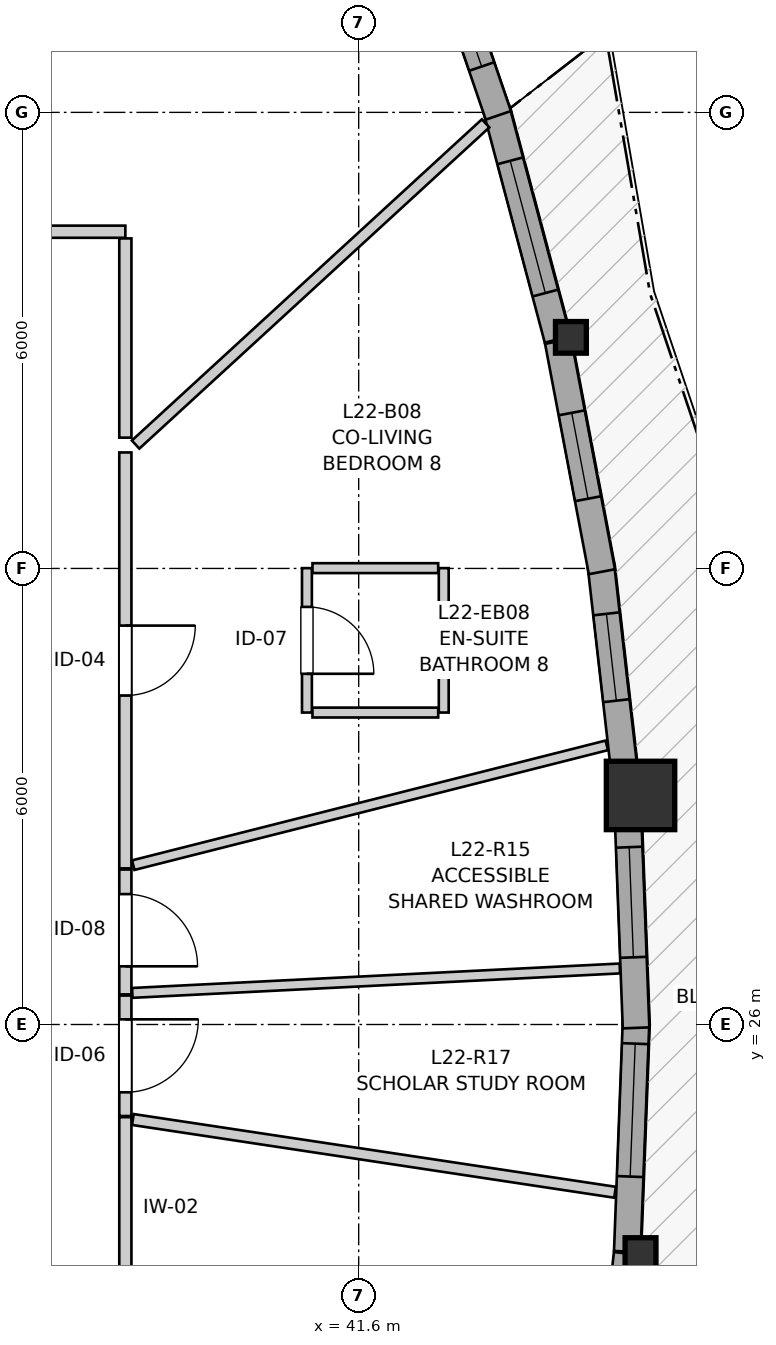
"""IFC4 building model, lengths in metres.
Left out: names, types, materials, properties, quantities, classifications, styles, units other than length and angle.
Written with IfcOpenShell. Run it as: python <this file> out.ifc"""

import sys

from ifc_helpers import new_model, si_unit, direction, frame, frame_2d, origin, origin_2d, place, context, subcontext, project, spatial, rectangle, i_section, extrude, source, transform, mapped, element, fill, save


model = new_model("IFC4")
c1 = context("Model", 3, precision=1e-05, world=origin(), true_north=direction((0.0, 1.0)))
c2 = subcontext(c1, "Body", "Model", "MODEL_VIEW")
j1 = project(units=[si_unit("LENGTHUNIT", "METRE"), si_unit("PLANEANGLEUNIT", "RADIAN")], contexts=[c1])
p1 = place(None, origin())
s1 = spatial("IfcSite", under=j1, at=p1, CompositionType="ELEMENT")
p2 = place(p1, origin())
s2 = spatial("IfcBuilding", under=s1, at=p2, CompositionType="ELEMENT")
p3 = place(p2, frame((0.0, 0.0, 76.8)))
s3 = spatial("IfcBuildingStorey", under=s2, at=p3, CompositionType="ELEMENT", Elevation=76.8)
m1 = source(origin(), c2, "Body", "SweptSolid", [
    extrude(i_section(OverallWidth=0.406, OverallDepth=0.416, WebThickness=0.027, FlangeThickness=0.044, FilletRadius=0.015, at=origin_2d()), origin(), (0.0, 0.0, 1.0), 2.935),
])
p4 = place(p3, frame((45.308, 22.987, 0.0), z_axis=(0.0, 0.0, 1.0), x_axis=(1.0, 0.0, 0.0)))
e1 = element("IfcColumn", 1, at=p4, inside=s3, PredefinedType="PILASTER", context=c2, shape_type="MappedRepresentation", body=[
    mapped(m1, transform((0.0, 0.0, 0.0), x_axis=(1.0, 0.0, 0.0), y_axis=(0.0, 1.0, 0.0), z_axis=(0.0, 0.0, 1.0), scale=1.0)),
])
m2 = source(origin(), c2, "Body", "SweptSolid", [
    extrude(rectangle(XDim=0.9, YDim=0.9, at=origin_2d()), origin(), (0.0, 0.0, 1.0), 2.935),
])
p5 = place(p3, frame((45.308, 29.013, 0.0), z_axis=(0.0, 0.0, 1.0), x_axis=(1.0, 0.0, 0.0)))
e2 = element("IfcColumn", 2, at=p5, inside=s3, PredefinedType="COLUMN", context=c2, shape_type="MappedRepresentation", body=[
    mapped(m2, transform((0.0, 0.0, 0.0), x_axis=(1.0, 0.0, 0.0), y_axis=(0.0, 1.0, 0.0), z_axis=(0.0, 0.0, 1.0), scale=1.0)),
])
p6 = place(p3, frame((44.392, 35.04, 0.0), z_axis=(0.0, 0.0, 1.0), x_axis=(1.0, 0.0, 0.0)))
e3 = element("IfcColumn", 3, at=p6, inside=s3, PredefinedType="PILASTER", context=c2, shape_type="MappedRepresentation", body=[
    mapped(m1, transform((0.0, 0.0, 0.0), x_axis=(1.0, 0.0, 0.0), y_axis=(0.0, 1.0, 0.0), z_axis=(0.0, 0.0, 1.0), scale=1.0)),
])
p7 = place(p3, frame((44.787, 19.955, 0.0), z_axis=(0.0, 0.0, 1.0), x_axis=(0.113232876367, 0.993568475602, 0.0)))
e4 = element("IfcWall", 4, at=p7, inside=s3, PredefinedType="SOLIDWALL", context=c2, shape_type="SweptSolid", body=[
    extrude(rectangle(XDim=3.051, YDim=0.35, at=frame_2d((1.525, 0.0))), origin(), (0.0, 0.0, 1.0), 2.465),
])
p8 = place(p7, frame((1.06, 0.0, 0.82)))
e5 = element("IfcOpeningElement", 5, at=p8, cuts=e4, PredefinedType="OPENING", context=c2, shape_type="SweptSolid", body=[
    extrude(rectangle(XDim=0.95, YDim=1.35, at=frame_2d((0.475, 0.675))), frame((0.0, 0.185, 0.0), z_axis=(0.0, -1.0, 0.0), x_axis=(1.0, 0.0, 0.0)), (0.0, 0.0, 1.0), 0.37),
])
p9 = place(p3, frame((45.134, 23.013, 0.0), z_axis=(0.0, 0.0, 1.0), x_axis=(0.037984969205, 0.999278310639, 0.0)))
e6 = element("IfcWall", 6, at=p9, inside=s3, PredefinedType="SOLIDWALL", context=c2, shape_type="SweptSolid", body=[
    extrude(rectangle(XDim=3.034, YDim=0.35, at=frame_2d((1.517, 0.0))), origin(), (0.0, 0.0, 1.0), 2.465),
])
p10 = place(p9, frame((0.987, 0.0, 0.82)))
e7 = element("IfcOpeningElement", 7, at=p10, cuts=e6, PredefinedType="OPENING", context=c2, shape_type="SweptSolid", body=[
    extrude(rectangle(XDim=1.75, YDim=1.3, at=frame_2d((0.875, 0.65))), frame((0.0, 0.185, 0.0), z_axis=(0.0, -1.0, 0.0), x_axis=(1.0, 0.0, 0.0)), (0.0, 0.0, 1.0), 0.37),
])
p11 = place(p3, frame((45.249, 25.955, 0.0), z_axis=(0.0, 0.0, 1.0), x_axis=(-0.0379756963, 0.999278663082, 0.0)))
e8 = element("IfcWall", 8, at=p11, inside=s3, PredefinedType="SOLIDWALL", context=c2, shape_type="SweptSolid", body=[
    extrude(rectangle(XDim=2.829, YDim=0.35, at=frame_2d((1.414, 0.0))), origin(), (0.0, 0.0, 1.0), 2.465),
])
p12 = place(p11, frame((0.929, 0.0, 0.82)))
e9 = element("IfcOpeningElement", 9, at=p12, cuts=e8, PredefinedType="OPENING", context=c2, shape_type="SweptSolid", body=[
    extrude(rectangle(XDim=1.45, YDim=1.25, at=frame_2d((0.725, 0.625))), frame((0.0, 0.185, 0.0), z_axis=(0.0, -1.0, 0.0), x_axis=(1.0, 0.0, 0.0)), (0.0, 0.0, 1.0), 0.37),
])
p13 = place(p3, frame((45.109, 29.217, 0.0), z_axis=(0.0, 0.0, 1.0), x_axis=(-0.11323690057, 0.993568016972, 0.0)))
e10 = element("IfcWall", 10, at=p13, inside=s3, PredefinedType="SOLIDWALL", context=c2, shape_type="SweptSolid", body=[
    extrude(rectangle(XDim=2.846, YDim=0.35, at=frame_2d((1.423, 0.0))), origin(), (0.0, 0.0, 1.0), 2.465),
])
p14 = place(p13, frame((1.05, 0.0, 0.82)))
e11 = element("IfcOpeningElement", 11, at=p14, cuts=e10, PredefinedType="OPENING", context=c2, shape_type="SweptSolid", body=[
    extrude(rectangle(XDim=1.15, YDim=1.2, at=frame_2d((0.575, 0.6))), frame((0.0, 0.185, 0.0), z_axis=(0.0, -1.0, 0.0), x_axis=(1.0, 0.0, 0.0)), (0.0, 0.0, 1.0), 0.37),
])
p15 = place(p3, frame((44.8, 31.957, 0.0), z_axis=(0.0, 0.0, 1.0), x_axis=(-0.186672102023, 0.982422274954, 0.0)))
e12 = element("IfcWall", 12, at=p15, inside=s3, PredefinedType="SOLIDWALL", context=c2, shape_type="SweptSolid", body=[
    extrude(rectangle(XDim=3.085, YDim=0.35, at=frame_2d((1.542, 0.0))), origin(), (0.0, 0.0, 1.0), 2.465),
])
p16 = place(p15, frame((0.978, 0.0, 0.82)))
e13 = element("IfcOpeningElement", 13, at=p16, cuts=e12, PredefinedType="OPENING", context=c2, shape_type="SweptSolid", body=[
    extrude(rectangle(XDim=1.15, YDim=1.2, at=frame_2d((0.575, 0.6))), frame((0.0, 0.185, 0.0), z_axis=(0.0, -1.0, 0.0), x_axis=(1.0, 0.0, 0.0)), (0.0, 0.0, 1.0), 0.37),
])
p17 = place(p3, frame((44.218, 35.014, 0.0), z_axis=(0.0, 0.0, 1.0), x_axis=(-0.25705209467, 0.96639754792, 0.0)))
e14 = element("IfcWall", 14, at=p17, inside=s3, PredefinedType="SOLIDWALL", context=c2, shape_type="SweptSolid", body=[
    extrude(rectangle(XDim=3.136, YDim=0.35, at=frame_2d((1.568, 0.0))), origin(), (0.0, 0.0, 1.0), 2.465),
])
p18 = place(p17, frame((0.63, 0.0, 0.82)))
e15 = element("IfcOpeningElement", 15, at=p18, cuts=e14, PredefinedType="OPENING", context=c2, shape_type="SweptSolid", body=[
    extrude(rectangle(XDim=1.8, YDim=1.45, at=frame_2d((0.9, 0.725))), frame((0.0, 0.185, 0.0), z_axis=(0.0, -1.0, 0.0), x_axis=(1.0, 0.0, 0.0)), (0.0, 0.0, 1.0), 0.37),
])
p19 = place(p3, frame((43.437, 37.961, 0.0), z_axis=(0.0, 0.0, 1.0), x_axis=(-0.323572555921, 0.946203361363, 0.0)))
e16 = element("IfcWall", 16, at=p19, inside=s3, PredefinedType="SOLIDWALL", context=c2, shape_type="SweptSolid", body=[
    extrude(rectangle(XDim=2.998, YDim=0.35, at=frame_2d((1.499, 0.0))), origin(), (0.0, 0.0, 1.0), 2.465),
])
p20 = place(p19, frame((0.679, 0.0, 0.82)))
e17 = element("IfcOpeningElement", 17, at=p20, cuts=e16, PredefinedType="OPENING", context=c2, shape_type="SweptSolid", body=[
    extrude(rectangle(XDim=1.65, YDim=1.45, at=frame_2d((0.825, 0.725))), frame((0.0, 0.185, 0.0), z_axis=(0.0, -1.0, 0.0), x_axis=(1.0, 0.0, 0.0)), (0.0, 0.0, 1.0), 0.37),
])
p21 = place(p3, frame((38.53, 24.781, 0.0), z_axis=(0.0, 0.0, 1.0), x_axis=(0.0, -1.0, 0.0)))
e18 = element("IfcWall", 18, at=p21, inside=s3, PredefinedType="PARTITIONING", context=c2, shape_type="SweptSolid", body=[
    extrude(rectangle(XDim=7.203, YDim=0.16, at=frame_2d((3.602, 0.0))), origin(), (0.0, 0.0, 1.0), 2.935),
])
p22 = place(p21, frame((3.119, 0.0, 0.0)))
e19 = element("IfcOpeningElement", 19, at=p22, cuts=e18, PredefinedType="OPENING", context=c2, shape_type="SweptSolid", body=[
    extrude(rectangle(XDim=0.96, YDim=2.1, at=frame_2d((0.48, 1.05))), frame((0.0, 0.09, 0.0), z_axis=(0.0, -1.0, 0.0), x_axis=(1.0, 0.0, 0.0)), (0.0, 0.0, 1.0), 0.18),
])
p23 = place(p3, frame((38.53, 33.526, 0.0), z_axis=(0.0, 0.0, 1.0), x_axis=(0.0, -1.0, 0.0)))
e20 = element("IfcWall", 20, at=p23, inside=s3, PredefinedType="PARTITIONING", context=c2, shape_type="SweptSolid", body=[
    extrude(rectangle(XDim=5.472, YDim=0.16, at=frame_2d((2.736, 0.0))), origin(), (0.0, 0.0, 1.0), 2.935),
])
p24 = place(p23, frame((2.278, 0.0, 0.0)))
e21 = element("IfcOpeningElement", 21, at=p24, cuts=e20, PredefinedType="OPENING", context=c2, shape_type="SweptSolid", body=[
    extrude(rectangle(XDim=0.92, YDim=2.1, at=frame_2d((0.46, 1.05))), frame((0.0, 0.09, 0.0), z_axis=(0.0, -1.0, 0.0), x_axis=(1.0, 0.0, 0.0)), (0.0, 0.0, 1.0), 0.18),
])
p25 = place(p3, frame((34.909, 36.43, 0.0), z_axis=(0.0, 0.0, 1.0), x_axis=(1.0, 0.0, 0.0)))
e22 = element("IfcWall", 22, at=p25, inside=s3, PredefinedType="PARTITIONING", context=c2, shape_type="SweptSolid", body=[
    extrude(rectangle(XDim=3.621, YDim=0.16, at=frame_2d((1.811, 0.0))), origin(), (0.0, 0.0, 1.0), 2.573),
])
p26 = place(p25, frame((1.339, 0.0, 0.0)))
e23 = element("IfcOpeningElement", 23, at=p26, cuts=e22, PredefinedType="OPENING", context=c2, shape_type="SweptSolid", body=[
    extrude(rectangle(XDim=0.96, YDim=2.1, at=frame_2d((0.48, 1.05))), frame((0.0, 0.09, 0.0), z_axis=(0.0, -1.0, 0.0), x_axis=(1.0, 0.0, 0.0)), (0.0, 0.0, 1.0), 0.18),
])
p27 = place(p3, frame((40.919, 32.004, 0.0), z_axis=(0.0, 0.0, 1.0), x_axis=(0.0, -1.0, 0.0)))
e24 = element("IfcWall", 24, at=p27, inside=s3, PredefinedType="PARTITIONING", context=c2, shape_type="SweptSolid", body=[
    extrude(rectangle(XDim=1.9, YDim=0.13, at=frame_2d((0.95, 0.0))), origin(), (0.0, 0.0, 1.0), 2.935),
])
p28 = place(p27, frame((0.51, 0.0, 0.0)))
e25 = element("IfcOpeningElement", 25, at=p28, cuts=e24, PredefinedType="OPENING", context=c2, shape_type="SweptSolid", body=[
    extrude(rectangle(XDim=0.88, YDim=2.05, at=frame_2d((0.44, 1.025))), frame((0.0, 0.075, 0.0), z_axis=(0.0, -1.0, 0.0), x_axis=(1.0, 0.0, 0.0)), (0.0, 0.0, 1.0), 0.15),
])
p29 = place(p3, frame((38.53, 28.039, 0.0), z_axis=(0.0, 0.0, 1.0), x_axis=(0.0, -1.0, 0.0)))
e26 = element("IfcWall", 26, at=p29, inside=s3, PredefinedType="PARTITIONING", context=c2, shape_type="SweptSolid", body=[
    extrude(rectangle(XDim=1.643, YDim=0.16, at=frame_2d((0.822, 0.0))), origin(), (0.0, 0.0, 1.0), 2.935),
])
p30 = place(p29, frame((0.323, 0.0, 0.0)))
e27 = element("IfcOpeningElement", 27, at=p30, cuts=e26, PredefinedType="OPENING", context=c2, shape_type="SweptSolid", body=[
    extrude(rectangle(XDim=0.95, YDim=2.1, at=frame_2d((0.475, 1.05))), frame((0.0, 0.09, 0.0), z_axis=(0.0, -1.0, 0.0), x_axis=(1.0, 0.0, 0.0)), (0.0, 0.0, 1.0), 0.18),
])
p31 = place(p3, frame((38.53, 26.381, 0.0), z_axis=(0.0, 0.0, 1.0), x_axis=(0.0, -1.0, 0.0)))
e28 = element("IfcWall", 28, at=p31, inside=s3, PredefinedType="PARTITIONING", context=c2, shape_type="SweptSolid", body=[
    extrude(rectangle(XDim=1.585, YDim=0.16, at=frame_2d((0.792, 0.0))), origin(), (0.0, 0.0, 1.0), 2.935),
])
p32 = place(p31, frame((0.313, 0.0, 0.0)))
e29 = element("IfcOpeningElement", 29, at=p32, cuts=e28, PredefinedType="OPENING", context=c2, shape_type="SweptSolid", body=[
    extrude(rectangle(XDim=0.96, YDim=2.1, at=frame_2d((0.48, 1.05))), frame((0.0, 0.09, 0.0), z_axis=(0.0, -1.0, 0.0), x_axis=(1.0, 0.0, 0.0)), (0.0, 0.0, 1.0), 0.18),
])
p33 = place(p3, frame((34.977, 36.546, 0.0), z_axis=(0.0, 0.0, 1.0), x_axis=(0.40175384449, 0.915747699117, 0.0)))
e30 = element("IfcWall", 30, at=p33, inside=s3, PredefinedType="PARTITIONING", context=c2, shape_type="SweptSolid", body=[
    extrude(rectangle(XDim=10.23, YDim=0.145, at=frame_2d((5.115, 0.0))), origin(), (0.0, 0.0, 1.0), 2.935),
])
p34 = place(p3, frame((38.634, 28.096, 0.0), z_axis=(0.0, 0.0, 1.0), x_axis=(0.969457090906, 0.245260981186, 0.0)))
e31 = element("IfcWall", 31, at=p34, inside=s3, PredefinedType="PARTITIONING", context=c2, shape_type="SweptSolid", body=[
    extrude(rectangle(XDim=6.427, YDim=0.13, at=frame_2d((3.213, 0.0))), origin(), (0.0, 0.0, 1.0), 2.935),
])
p35 = place(p3, frame((38.629, 24.75, 0.0), z_axis=(0.0, 0.0, 1.0), x_axis=(0.988806184902, -0.149205659073, 0.0)))
e32 = element("IfcWall", 32, at=p35, inside=s3, PredefinedType="PARTITIONING", context=c2, shape_type="SweptSolid", body=[
    extrude(rectangle(XDim=6.416, YDim=0.145, at=frame_2d((3.208, 0.0))), origin(), (0.0, 0.0, 1.0), 2.935),
])
p36 = place(p3, frame((38.621, 26.416, 0.0), z_axis=(0.0, 0.0, 1.0), x_axis=(0.998746074583, 0.050062745689, 0.0)))
e33 = element("IfcWall", 33, at=p36, inside=s3, PredefinedType="PARTITIONING", context=c2, shape_type="SweptSolid", body=[
    extrude(rectangle(XDim=6.423, YDim=0.13, at=frame_2d((3.211, 0.0))), origin(), (0.0, 0.0, 1.0), 2.935),
])
p37 = place(p3, frame((38.665, 33.63, 0.0), z_axis=(0.0, 0.0, 1.0), x_axis=(0.736824900837, 0.676083623161, 0.0)))
e34 = element("IfcWall", 34, at=p37, inside=s3, PredefinedType="PARTITIONING", context=c2, shape_type="SweptSolid", body=[
    extrude(rectangle(XDim=6.25, YDim=0.145, at=frame_2d((3.125, 0.0))), origin(), (0.0, 0.0, 1.0), 2.935),
])
p38 = place(p3, frame((38.53, 33.721, 0.0), z_axis=(0.0, 0.0, 1.0), x_axis=(0.0, 1.0, 0.0)))
e35 = element("IfcWall", 35, at=p38, inside=s3, PredefinedType="PARTITIONING", context=c2, shape_type="SweptSolid", body=[
    extrude(rectangle(XDim=2.621, YDim=0.16, at=frame_2d((1.311, 0.0))), origin(), (0.0, 0.0, 1.0), 2.573),
])
p39 = place(p3, frame((42.719, 30.104, 0.0), z_axis=(0.0, 0.0, 1.0), x_axis=(0.0, 1.0, 0.0)))
e36 = element("IfcWall", 36, at=p39, inside=s3, PredefinedType="PARTITIONING", context=c2, shape_type="SweptSolid", body=[
    extrude(rectangle(XDim=1.9, YDim=0.13, at=frame_2d((0.95, 0.0))), origin(), (0.0, 0.0, 1.0), 2.935),
])
for number, where, z_axis, x_axis in (
    (37, (40.992, 32.004, 0.0), (0.0, 0.0, 1.0), (1.0, 0.0, 0.0)),
    (38, (40.992, 30.104, 0.0), (0.0, 0.0, 1.0), (1.0, 0.0, 0.0)),
):
    element("IfcWall", number, at=place(p3, frame(where, z_axis=z_axis, x_axis=x_axis)), inside=s3, PredefinedType="PARTITIONING", context=c2, shape_type="SweptSolid", body=[
        extrude(rectangle(XDim=1.654, YDim=0.13, at=frame_2d((0.827, 0.0))), origin(), (0.0, 0.0, 1.0), 2.935),
    ])
m3 = source(origin(), c2, "Body", "SweptSolid", [
    extrude(rectangle(XDim=1.75, YDim=1.3, at=frame_2d((0.875, 0.65))), frame((0.0, 0.03, 0.0), z_axis=(0.0, -1.0, 0.0), x_axis=(1.0, 0.0, 0.0)), (0.0, 0.0, 1.0), 0.06),
])
p40 = place(p10, origin())
e39 = element("IfcWindow", 39, at=p40, inside=s3, PartitioningType="SINGLE_PANEL", PredefinedType="WINDOW", context=c2, shape_type="MappedRepresentation", body=[
    mapped(m3, transform((0.0, 0.0, 0.0), x_axis=(1.0, 0.0, 0.0), y_axis=(0.0, 1.0, 0.0), z_axis=(0.0, 0.0, 1.0), scale=1.0)),
])
fill(e7, e39)
m4 = source(origin(), c2, "Body", "SweptSolid", [
    extrude(rectangle(XDim=1.45, YDim=1.25, at=frame_2d((0.725, 0.625))), frame((0.0, 0.03, 0.0), z_axis=(0.0, -1.0, 0.0), x_axis=(1.0, 0.0, 0.0)), (0.0, 0.0, 1.0), 0.06),
])
p41 = place(p12, origin())
e40 = element("IfcWindow", 40, at=p41, inside=s3, PartitioningType="SINGLE_PANEL", PredefinedType="WINDOW", context=c2, shape_type="MappedRepresentation", body=[
    mapped(m4, transform((0.0, 0.0, 0.0), x_axis=(1.0, 0.0, 0.0), y_axis=(0.0, 1.0, 0.0), z_axis=(0.0, 0.0, 1.0), scale=1.0)),
])
fill(e9, e40)
m5 = source(origin(), c2, "Body", "SweptSolid", [
    extrude(rectangle(XDim=1.15, YDim=1.2, at=frame_2d((0.575, 0.6))), frame((0.0, 0.03, 0.0), z_axis=(0.0, -1.0, 0.0), x_axis=(1.0, 0.0, 0.0)), (0.0, 0.0, 1.0), 0.06),
])
p42 = place(p14, origin())
e41 = element("IfcWindow", 41, at=p42, inside=s3, PartitioningType="SINGLE_PANEL", PredefinedType="WINDOW", context=c2, shape_type="MappedRepresentation", body=[
    mapped(m5, transform((0.0, 0.0, 0.0), x_axis=(1.0, 0.0, 0.0), y_axis=(0.0, 1.0, 0.0), z_axis=(0.0, 0.0, 1.0), scale=1.0)),
])
fill(e11, e41)
p43 = place(p16, origin())
e42 = element("IfcWindow", 42, at=p43, inside=s3, PartitioningType="SINGLE_PANEL", PredefinedType="WINDOW", context=c2, shape_type="MappedRepresentation", body=[
    mapped(m5, transform((0.0, 0.0, 0.0), x_axis=(1.0, 0.0, 0.0), y_axis=(0.0, 1.0, 0.0), z_axis=(0.0, 0.0, 1.0), scale=1.0)),
])
fill(e13, e42)
m6 = source(origin(), c2, "Body", "SweptSolid", [
    extrude(rectangle(XDim=1.8, YDim=1.45, at=frame_2d((0.9, 0.725))), frame((0.0, 0.03, 0.0), z_axis=(0.0, -1.0, 0.0), x_axis=(1.0, 0.0, 0.0)), (0.0, 0.0, 1.0), 0.06),
])
p44 = place(p18, origin())
e43 = element("IfcWindow", 43, at=p44, inside=s3, PartitioningType="SINGLE_PANEL", PredefinedType="WINDOW", context=c2, shape_type="MappedRepresentation", body=[
    mapped(m6, transform((0.0, 0.0, 0.0), x_axis=(1.0, 0.0, 0.0), y_axis=(0.0, 1.0, 0.0), z_axis=(0.0, 0.0, 1.0), scale=1.0)),
])
fill(e15, e43)
m7 = source(origin(), c2, "Body", "SweptSolid", [
    extrude(rectangle(XDim=1.65, YDim=1.45, at=frame_2d((0.825, 0.725))), frame((0.0, 0.03, 0.0), z_axis=(0.0, -1.0, 0.0), x_axis=(1.0, 0.0, 0.0)), (0.0, 0.0, 1.0), 0.06),
])
p45 = place(p20, origin())
e44 = element("IfcWindow", 44, at=p45, inside=s3, PartitioningType="SINGLE_PANEL", PredefinedType="WINDOW", context=c2, shape_type="MappedRepresentation", body=[
    mapped(m7, transform((0.0, 0.0, 0.0), x_axis=(1.0, 0.0, 0.0), y_axis=(0.0, 1.0, 0.0), z_axis=(0.0, 0.0, 1.0), scale=1.0)),
])
fill(e17, e44)
m8 = source(origin(), c2, "Body", "SweptSolid", [
    extrude(rectangle(XDim=0.92, YDim=2.1, at=frame_2d((0.46, 1.05))), frame((0.0, 0.025, 0.0), z_axis=(0.0, -1.0, 0.0), x_axis=(1.0, 0.0, 0.0)), (0.0, 0.0, 1.0), 0.05),
])
p46 = place(p24, origin())
e45 = element("IfcDoor", 45, at=p46, inside=s3, OperationType="SINGLE_SWING_LEFT", PredefinedType="DOOR", context=c2, shape_type="MappedRepresentation", body=[
    mapped(m8, transform((0.0, 0.0, 0.0), x_axis=(1.0, 0.0, 0.0), y_axis=(0.0, 1.0, 0.0), z_axis=(0.0, 0.0, 1.0), scale=1.0)),
])
fill(e21, e45)
m9 = source(origin(), c2, "Body", "SweptSolid", [
    extrude(rectangle(XDim=0.88, YDim=2.05, at=frame_2d((0.44, 1.025))), frame((0.0, 0.025, 0.0), z_axis=(0.0, -1.0, 0.0), x_axis=(1.0, 0.0, 0.0)), (0.0, 0.0, 1.0), 0.05),
])
p47 = place(p28, origin())
e46 = element("IfcDoor", 46, at=p47, inside=s3, OperationType="SINGLE_SWING_RIGHT", PredefinedType="DOOR", context=c2, shape_type="MappedRepresentation", body=[
    mapped(m9, transform((0.0, 0.0, 0.0), x_axis=(1.0, 0.0, 0.0), y_axis=(0.0, 1.0, 0.0), z_axis=(0.0, 0.0, 1.0), scale=1.0)),
])
fill(e25, e46)
m10 = source(origin(), c2, "Body", "SweptSolid", [
    extrude(rectangle(XDim=0.95, YDim=2.1, at=frame_2d((0.475, 1.05))), frame((0.0, 0.025, 0.0), z_axis=(0.0, -1.0, 0.0), x_axis=(1.0, 0.0, 0.0)), (0.0, 0.0, 1.0), 0.05),
])
p48 = place(p30, origin())
e47 = element("IfcDoor", 47, at=p48, inside=s3, OperationType="SINGLE_SWING_RIGHT", PredefinedType="DOOR", context=c2, shape_type="MappedRepresentation", body=[
    mapped(m10, transform((0.0, 0.0, 0.0), x_axis=(1.0, 0.0, 0.0), y_axis=(0.0, 1.0, 0.0), z_axis=(0.0, 0.0, 1.0), scale=1.0)),
])
fill(e27, e47)
m11 = source(origin(), c2, "Body", "SweptSolid", [
    extrude(rectangle(XDim=0.96, YDim=2.1, at=frame_2d((0.48, 1.05))), frame((0.0, 0.025, 0.0), z_axis=(0.0, -1.0, 0.0), x_axis=(1.0, 0.0, 0.0)), (0.0, 0.0, 1.0), 0.05),
])
p49 = place(p32, origin())
e48 = element("IfcDoor", 48, at=p49, inside=s3, OperationType="SINGLE_SWING_LEFT", PredefinedType="DOOR", context=c2, shape_type="MappedRepresentation", body=[
    mapped(m11, transform((0.0, 0.0, 0.0), x_axis=(1.0, 0.0, 0.0), y_axis=(0.0, 1.0, 0.0), z_axis=(0.0, 0.0, 1.0), scale=1.0)),
])
fill(e29, e48)
save(model, sys.argv[1])
